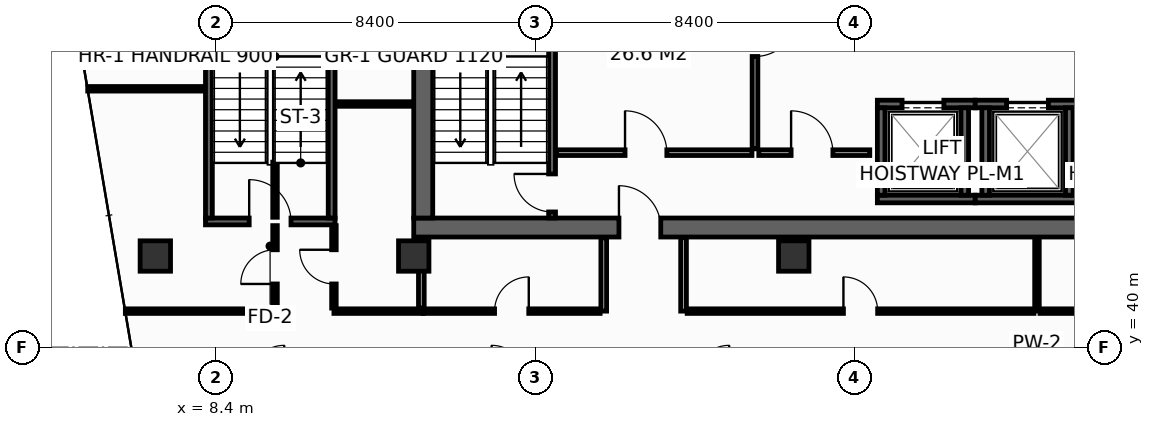
"""IFC4 building model, lengths in metres.
Left out: names, types, materials, properties, quantities, classifications, styles, units other than length and angle.
Written with IfcOpenShell. Run it as: python <this file> out.ifc"""

import sys

from ifc_helpers import new_model, si_unit, direction, frame, frame_2d, origin, origin_2d, place, context, subcontext, project, spatial, rectangle, hollow_rectangle, extrude, element, fill, save


model = new_model("IFC4")
c1 = context("Model", 3, precision=1e-05, world=origin(), true_north=direction((0.0, 1.0)))
c2 = subcontext(c1, "Body", "Model", "MODEL_VIEW")
j1 = project(units=[si_unit("LENGTHUNIT", "METRE"), si_unit("PLANEANGLEUNIT", "RADIAN")], contexts=[c1])
p1 = place(None, origin())
s1 = spatial("IfcSite", under=j1, at=p1, CompositionType="ELEMENT")
p2 = place(p1, origin())
s2 = spatial("IfcBuilding", under=s1, at=p2, CompositionType="ELEMENT")
p3 = place(p2, frame((0.0, 0.0, 182.8)))
s3 = spatial("IfcBuildingStorey", under=s2, at=p3, CompositionType="ELEMENT", Elevation=182.8)
p4 = place(p3, frame((13.6, 43.15, 0.0), z_axis=(0.0, 0.0, 1.0), x_axis=(1.0, 0.0, 0.0)))
e1 = element("IfcWall", 1, at=p4, inside=s3, PredefinedType="SHEAR", context=c2, shape_type="SweptSolid", body=[
    extrude(rectangle(XDim=32.7, YDim=0.5, at=frame_2d((16.35, 0.0))), origin(), (0.0, 0.0, 1.0), 3.55),
])
p5 = place(p4, frame((5.4, 0.0, 0.0)))
e2 = element("IfcOpeningElement", 2, at=p5, cuts=e1, PredefinedType="OPENING", context=c2, shape_type="SweptSolid", body=[
    extrude(rectangle(XDim=1.1, YDim=2.15, at=frame_2d((0.55, 1.075))), frame((0.0, 0.26, 0.0), z_axis=(0.0, -1.0, 0.0), x_axis=(1.0, 0.0, 0.0)), (0.0, 0.0, 1.0), 0.52),
])
p6 = place(p4, frame((25.6, 0.0, 0.0)))
e3 = element("IfcOpeningElement", 3, at=p6, cuts=e1, PredefinedType="OPENING", context=c2, shape_type="SweptSolid", body=[
    extrude(rectangle(XDim=1.1, YDim=2.15, at=frame_2d((0.55, 1.075))), frame((0.0, 0.26, 0.0), z_axis=(0.0, -1.0, 0.0), x_axis=(1.0, 0.0, 0.0)), (0.0, 0.0, 1.0), 0.52),
])
p7 = place(p3, frame((13.85, 43.4, 0.0), z_axis=(0.0, 0.0, 1.0), x_axis=(0.0, 1.0, 0.0)))
e4 = element("IfcWall", 4, at=p7, inside=s3, PredefinedType="SHEAR", context=c2, shape_type="SweptSolid", body=[
    extrude(rectangle(XDim=10.4, YDim=0.5, at=frame_2d((5.2, 0.0))), origin(), (0.0, 0.0, 1.0), 3.55),
])
for number, where, z_axis, x_axis in (
    (5, (6.8, 42.4, 0.0), (0.0, 0.0, 1.0), (1.0, 0.0, 0.0)),
    (6, (13.6, 42.4, 0.0), (0.0, 0.0, 1.0), (1.0, 0.0, 0.0)),
    (7, (23.6, 42.4, 0.0), (0.0, 0.0, 1.0), (1.0, 0.0, 0.0)),
):
    element("IfcColumn", number, at=place(p3, frame(where, z_axis=z_axis, x_axis=x_axis)), inside=s3, PredefinedType="COLUMN", context=c2, shape_type="SweptSolid", body=[
        extrude(hollow_rectangle(XDim=0.8, YDim=0.8, WallThickness=0.036, at=origin_2d()), origin(), (0.0, 0.0, 1.0), 3.8),
    ])
p8 = place(p3, frame((25.8, 43.9, 0.0), z_axis=(0.0, 0.0, 1.0), x_axis=(1.0, 0.0, 0.0)))
e8 = element("IfcWall", 8, at=p8, inside=s3, PredefinedType="SHEAR", context=c2, shape_type="SweptSolid", body=[
    extrude(rectangle(XDim=2.575, YDim=0.2, at=frame_2d((1.288, 0.0))), origin(), (0.0, 0.0, 1.0), 3.55),
])
p9 = place(p3, frame((25.8, 46.4, 0.0), z_axis=(0.0, 0.0, 1.0), x_axis=(1.0, 0.0, 0.0)))
e9 = element("IfcWall", 9, at=p9, inside=s3, PredefinedType="SHEAR", context=c2, shape_type="SweptSolid", body=[
    extrude(rectangle(XDim=2.575, YDim=0.2, at=frame_2d((1.288, 0.0))), origin(), (0.0, 0.0, 1.0), 3.55),
])
p10 = place(p9, frame((0.65, 0.0, 0.0)))
e10 = element("IfcOpeningElement", 10, at=p10, cuts=e9, PredefinedType="OPENING", context=c2, shape_type="SweptSolid", body=[
    extrude(rectangle(XDim=1.1, YDim=2.2, at=frame_2d((0.55, 1.1))), frame((0.0, 0.11, 0.0), z_axis=(0.0, -1.0, 0.0), x_axis=(1.0, 0.0, 0.0)), (0.0, 0.0, 1.0), 0.22),
])
for number, where, z_axis, x_axis in (
    (11, (25.9, 44.0, 0.0), (0.0, 0.0, 1.0), (0.0, 1.0, 0.0)),
    (12, (28.1, 44.0, 0.0), (0.0, 0.0, 1.0), (0.0, 1.0, 0.0)),
):
    element("IfcWall", number, at=place(p3, frame(where, z_axis=z_axis, x_axis=x_axis)), inside=s3, PredefinedType="SHEAR", context=c2, shape_type="SweptSolid", body=[
        extrude(rectangle(XDim=2.3, YDim=0.2, at=frame_2d((1.15, 0.0))), origin(), (0.0, 0.0, 1.0), 3.55),
    ])
p11 = place(p3, frame((28.375, 43.9, 0.0), z_axis=(0.0, 0.0, 1.0), x_axis=(1.0, 0.0, 0.0)))
e13 = element("IfcWall", 13, at=p11, inside=s3, PredefinedType="SHEAR", context=c2, shape_type="SweptSolid", body=[
    extrude(rectangle(XDim=2.75, YDim=0.2, at=frame_2d((1.375, 0.0))), origin(), (0.0, 0.0, 1.0), 3.55),
])
p12 = place(p3, frame((28.375, 46.4, 0.0), z_axis=(0.0, 0.0, 1.0), x_axis=(1.0, 0.0, 0.0)))
e14 = element("IfcWall", 14, at=p12, inside=s3, PredefinedType="SHEAR", context=c2, shape_type="SweptSolid", body=[
    extrude(rectangle(XDim=2.75, YDim=0.2, at=frame_2d((1.375, 0.0))), origin(), (0.0, 0.0, 1.0), 3.55),
])
p13 = place(p12, frame((0.825, 0.0, 0.0)))
e15 = element("IfcOpeningElement", 15, at=p13, cuts=e14, PredefinedType="OPENING", context=c2, shape_type="SweptSolid", body=[
    extrude(rectangle(XDim=1.1, YDim=2.2, at=frame_2d((0.55, 1.1))), frame((0.0, 0.11, 0.0), z_axis=(0.0, -1.0, 0.0), x_axis=(1.0, 0.0, 0.0)), (0.0, 0.0, 1.0), 0.22),
])
for number, where, z_axis, x_axis in (
    (16, (28.65, 44.0, 0.0), (0.0, 0.0, 1.0), (0.0, 1.0, 0.0)),
    (17, (30.85, 44.0, 0.0), (0.0, 0.0, 1.0), (0.0, 1.0, 0.0)),
):
    element("IfcWall", number, at=place(p3, frame(where, z_axis=z_axis, x_axis=x_axis)), inside=s3, PredefinedType="SHEAR", context=c2, shape_type="SweptSolid", body=[
        extrude(rectangle(XDim=2.3, YDim=0.2, at=frame_2d((1.15, 0.0))), origin(), (0.0, 0.0, 1.0), 3.55),
    ])
p14 = place(p3, frame((17.24, 43.4, 0.0), z_axis=(0.0, 0.0, 1.0), x_axis=(0.0, 1.0, 0.0)))
e18 = element("IfcWall", 18, at=p14, inside=s3, PredefinedType="SHEAR", context=c2, shape_type="SweptSolid", body=[
    extrude(rectangle(XDim=10.4, YDim=0.18, at=frame_2d((5.2, 0.0))), origin(), (0.0, 0.0, 1.0), 3.55),
])
p15 = place(p14, frame((0.16, 0.0, 0.0)))
e19 = element("IfcOpeningElement", 19, at=p15, cuts=e18, PredefinedType="OPENING", context=c2, shape_type="SweptSolid", body=[
    extrude(rectangle(XDim=1.0, YDim=2.15, at=frame_2d((0.5, 1.075))), frame((0.0, 0.1, 0.0), z_axis=(0.0, -1.0, 0.0), x_axis=(1.0, 0.0, 0.0)), (0.0, 0.0, 1.0), 0.2),
])
p16 = place(p3, frame((8.12, 43.31, 0.0), z_axis=(0.0, 0.0, 1.0), x_axis=(1.0, 0.0, 0.0)))
e20 = element("IfcWall", 20, at=p16, inside=s3, PredefinedType="SHEAR", context=c2, shape_type="SweptSolid", body=[
    extrude(rectangle(XDim=3.41, YDim=0.18, at=frame_2d((1.705, 0.0))), origin(), (0.0, 0.0, 1.0), 3.55),
])
p17 = place(p16, frame((1.15, 0.0, 0.0)))
e21 = element("IfcOpeningElement", 21, at=p17, cuts=e20, PredefinedType="OPENING", context=c2, shape_type="SweptSolid", body=[
    extrude(rectangle(XDim=1.1, YDim=2.15, at=frame_2d((0.55, 1.075))), frame((0.0, 0.1, 0.0), z_axis=(0.0, -1.0, 0.0), x_axis=(1.0, 0.0, 0.0)), (0.0, 0.0, 1.0), 0.2),
])
for number, where, z_axis, x_axis in (
    (22, (11.44, 43.4, 0.0), (0.0, 0.0, 1.0), (0.0, 1.0, 0.0)),
    (23, (8.21, 53.8, 0.0), (0.0, 0.0, 1.0), (0.0, -1.0, 0.0)),
):
    element("IfcWall", number, at=place(p3, frame(where, z_axis=z_axis, x_axis=x_axis)), inside=s3, PredefinedType="SHEAR", context=c2, shape_type="SweptSolid", body=[
        extrude(rectangle(XDim=10.4, YDim=0.18, at=frame_2d((5.2, 0.0))), origin(), (0.0, 0.0, 1.0), 3.55),
    ])
p18 = place(p3, frame((17.36, 45.12, 0.0), z_axis=(0.0, 0.0, 1.0), x_axis=(1.0, 0.0, 0.0)))
e24 = element("IfcWall", 24, at=p18, inside=s3, PredefinedType="PARTITIONING", context=c2, shape_type="SweptSolid", body=[
    extrude(rectangle(XDim=5.14, YDim=0.15, at=frame_2d((2.57, 0.0))), origin(), (0.0, 0.0, 1.0), 3.55),
])
p19 = place(p18, frame((1.8, 0.0, 0.0)))
e25 = element("IfcOpeningElement", 25, at=p19, cuts=e24, PredefinedType="OPENING", context=c2, shape_type="SweptSolid", body=[
    extrude(rectangle(XDim=1.1, YDim=2.15, at=frame_2d((0.55, 1.075))), frame((0.0, 0.085, 0.0), z_axis=(0.0, -1.0, 0.0), x_axis=(1.0, 0.0, 0.0)), (0.0, 0.0, 1.0), 0.17),
])
p20 = place(p3, frame((22.58, 50.55, 0.0), z_axis=(0.0, 0.0, 1.0), x_axis=(0.0, -1.0, 0.0)))
e26 = element("IfcWall", 26, at=p20, inside=s3, PredefinedType="PARTITIONING", context=c2, shape_type="SweptSolid", body=[
    extrude(rectangle(XDim=5.33, YDim=0.15, at=frame_2d((2.665, 0.0))), origin(), (0.0, 0.0, 1.0), 3.55),
])
p21 = place(p20, frame((1.8, 0.0, 0.0)))
e27 = element("IfcOpeningElement", 27, at=p21, cuts=e26, PredefinedType="OPENING", context=c2, shape_type="SweptSolid", body=[
    extrude(rectangle(XDim=1.1, YDim=2.15, at=frame_2d((0.55, 1.075))), frame((0.0, 0.085, 0.0), z_axis=(0.0, -1.0, 0.0), x_axis=(1.0, 0.0, 0.0)), (0.0, 0.0, 1.0), 0.17),
])
p22 = place(p3, frame((22.68, 45.12, 0.0), z_axis=(0.0, 0.0, 1.0), x_axis=(1.0, 0.0, 0.0)))
e28 = element("IfcWall", 28, at=p22, inside=s3, PredefinedType="PARTITIONING", context=c2, shape_type="SweptSolid", body=[
    extrude(rectangle(XDim=2.92, YDim=0.15, at=frame_2d((1.46, 0.0))), origin(), (0.0, 0.0, 1.0), 3.55),
])
p23 = place(p22, frame((0.85, 0.0, 0.0)))
e29 = element("IfcOpeningElement", 29, at=p23, cuts=e28, PredefinedType="OPENING", context=c2, shape_type="SweptSolid", body=[
    extrude(rectangle(XDim=1.1, YDim=2.15, at=frame_2d((0.55, 1.075))), frame((0.0, 0.085, 0.0), z_axis=(0.0, -1.0, 0.0), x_axis=(1.0, 0.0, 0.0)), (0.0, 0.0, 1.0), 0.17),
])
p24 = place(p3, frame((6.011, 40.95, 0.0), z_axis=(0.0, 0.0, 1.0), x_axis=(1.0, 0.0, 0.0)))
e30 = element("IfcWall", 30, at=p24, inside=s3, PredefinedType="PARTITIONING", context=c2, shape_type="SweptSolid", body=[
    extrude(rectangle(XDim=3.939, YDim=0.12, at=frame_2d((1.969, 0.0))), origin(), (0.0, 0.0, 1.0), 3.035),
])
p25 = place(p3, frame((11.5, 40.95, 0.0), z_axis=(0.0, 0.0, 1.0), x_axis=(1.0, 0.0, 0.0)))
e31 = element("IfcWall", 31, at=p25, inside=s3, PredefinedType="PARTITIONING", context=c2, shape_type="SweptSolid", body=[
    extrude(rectangle(XDim=2.35, YDim=0.12, at=frame_2d((1.175, 0.0))), origin(), (0.0, 0.0, 1.0), 3.55),
])
p26 = place(p3, frame((5.021, 46.8, 0.0), z_axis=(0.0, 0.0, 1.0), x_axis=(1.0, 0.0, 0.0)))
e32 = element("IfcWall", 32, at=p26, inside=s3, PredefinedType="PARTITIONING", context=c2, shape_type="SweptSolid", body=[
    extrude(rectangle(XDim=3.079, YDim=0.12, at=frame_2d((1.54, 0.0))), origin(), (0.0, 0.0, 1.0), 2.835),
])
p27 = place(p3, frame((9.95, 41.03, 0.0), z_axis=(0.0, 0.0, 1.0), x_axis=(0.0, 1.0, 0.0)))
e33 = element("IfcWall", 33, at=p27, inside=s3, PredefinedType="PARTITIONING", context=c2, shape_type="SweptSolid", body=[
    extrude(rectangle(XDim=2.17, YDim=0.12, at=frame_2d((1.085, 0.0))), origin(), (0.0, 0.0, 1.0), 2.835),
])
p28 = place(p27, frame((0.635, 0.0, 0.0)))
e34 = element("IfcOpeningElement", 34, at=p28, cuts=e33, PredefinedType="OPENING", context=c2, shape_type="SweptSolid", body=[
    extrude(rectangle(XDim=0.9, YDim=2.1, at=frame_2d((0.45, 1.05))), frame((0.0, 0.07, 0.0), z_axis=(0.0, -1.0, 0.0), x_axis=(1.0, 0.0, 0.0)), (0.0, 0.0, 1.0), 0.14),
])
p29 = place(p3, frame((9.95, 43.42, 0.0), z_axis=(0.0, 0.0, 1.0), x_axis=(0.0, 1.0, 0.0)))
e35 = element("IfcWall", 35, at=p29, inside=s3, PredefinedType="PARTITIONING", context=c2, shape_type="SweptSolid", body=[
    extrude(rectangle(XDim=1.45, YDim=0.12, at=frame_2d((0.725, 0.0))), origin(), (0.0, 0.0, 1.0), 3.55),
])
p30 = place(p3, frame((11.55, 46.4, 0.0), z_axis=(0.0, 0.0, 1.0), x_axis=(1.0, 0.0, 0.0)))
e36 = element("IfcWall", 36, at=p30, inside=s3, PredefinedType="PARTITIONING", context=c2, shape_type="SweptSolid", body=[
    extrude(rectangle(XDim=2.03, YDim=0.12, at=frame_2d((1.015, 0.0))), origin(), (0.0, 0.0, 1.0), 3.55),
])
p31 = place(p3, frame((11.5, 41.03, 0.0), z_axis=(0.0, 0.0, 1.0), x_axis=(0.0, 1.0, 0.0)))
e37 = element("IfcWall", 37, at=p31, inside=s3, PredefinedType="PARTITIONING", context=c2, shape_type="SweptSolid", body=[
    extrude(rectangle(XDim=2.17, YDim=0.12, at=frame_2d((1.085, 0.0))), origin(), (0.0, 0.0, 1.0), 2.835),
])
p32 = place(p31, frame((0.635, 0.0, 0.0)))
e38 = element("IfcOpeningElement", 38, at=p32, cuts=e37, PredefinedType="OPENING", context=c2, shape_type="SweptSolid", body=[
    extrude(rectangle(XDim=0.9, YDim=2.1, at=frame_2d((0.45, 1.05))), frame((0.0, 0.07, 0.0), z_axis=(0.0, -1.0, 0.0), x_axis=(1.0, 0.0, 0.0)), (0.0, 0.0, 1.0), 0.14),
])
p33 = place(p3, frame((13.8, 41.03, 0.0), z_axis=(0.0, 0.0, 1.0), x_axis=(0.0, 1.0, 0.0)))
e39 = element("IfcWall", 39, at=p33, inside=s3, PredefinedType="PARTITIONING", context=c2, shape_type="SweptSolid", body=[
    extrude(rectangle(XDim=1.85, YDim=0.15, at=frame_2d((0.925, 0.0))), origin(), (0.0, 0.0, 1.0), 3.55),
])
for number, where, z_axis, x_axis in (
    (40, (18.6, 40.95, 0.0), (0.0, 0.0, 1.0), (0.0, 1.0, 0.0)),
    (41, (20.7, 40.95, 0.0), (0.0, 0.0, 1.0), (0.0, 1.0, 0.0)),
):
    element("IfcWall", number, at=place(p3, frame(where, z_axis=z_axis, x_axis=x_axis)), inside=s3, PredefinedType="PARTITIONING", context=c2, shape_type="SweptSolid", body=[
        extrude(rectangle(XDim=1.93, YDim=0.15, at=frame_2d((0.965, 0.0))), origin(), (0.0, 0.0, 1.0), 3.55),
    ])
p34 = place(p3, frame((13.85, 40.95, 0.0), z_axis=(0.0, 0.0, 1.0), x_axis=(1.0, 0.0, 0.0)))
e42 = element("IfcWall", 42, at=p34, inside=s3, PredefinedType="PARTITIONING", context=c2, shape_type="SweptSolid", body=[
    extrude(rectangle(XDim=4.655, YDim=0.12, at=frame_2d((2.327, 0.0))), origin(), (0.0, 0.0, 1.0), 3.55),
])
p35 = place(p34, frame((1.877, 0.0, 0.0)))
e43 = element("IfcOpeningElement", 43, at=p35, cuts=e42, PredefinedType="OPENING", context=c2, shape_type="SweptSolid", body=[
    extrude(rectangle(XDim=0.9, YDim=2.1, at=frame_2d((0.45, 1.05))), frame((0.0, 0.07, 0.0), z_axis=(0.0, -1.0, 0.0), x_axis=(1.0, 0.0, 0.0)), (0.0, 0.0, 1.0), 0.14),
])
p36 = place(p3, frame((30.0, 40.95, 0.0), z_axis=(0.0, 0.0, 1.0), x_axis=(0.0, 1.0, 0.0)))
e44 = element("IfcWall", 44, at=p36, inside=s3, PredefinedType="PARTITIONING", context=c2, shape_type="SweptSolid", body=[
    extrude(rectangle(XDim=1.93, YDim=0.12, at=frame_2d((0.965, 0.0))), origin(), (0.0, 0.0, 1.0), 2.835),
])
p37 = place(p3, frame((20.795, 40.95, 0.0), z_axis=(0.0, 0.0, 1.0), x_axis=(1.0, 0.0, 0.0)))
e45 = element("IfcWall", 45, at=p37, inside=s3, PredefinedType="PARTITIONING", context=c2, shape_type="SweptSolid", body=[
    extrude(rectangle(XDim=9.125, YDim=0.12, at=frame_2d((4.562, 0.0))), origin(), (0.0, 0.0, 1.0), 2.835),
])
p38 = place(p37, frame((4.112, 0.0, 0.0)))
e46 = element("IfcOpeningElement", 46, at=p38, cuts=e45, PredefinedType="OPENING", context=c2, shape_type="SweptSolid", body=[
    extrude(rectangle(XDim=0.9, YDim=2.1, at=frame_2d((0.45, 1.05))), frame((0.0, 0.07, 0.0), z_axis=(0.0, -1.0, 0.0), x_axis=(1.0, 0.0, 0.0)), (0.0, 0.0, 1.0), 0.14),
])
p39 = place(p3, frame((30.08, 40.95, 0.0), z_axis=(0.0, 0.0, 1.0), x_axis=(1.0, 0.0, 0.0)))
e47 = element("IfcWall", 47, at=p39, inside=s3, PredefinedType="PARTITIONING", context=c2, shape_type="SweptSolid", body=[
    extrude(rectangle(XDim=8.625, YDim=0.12, at=frame_2d((4.312, 0.0))), origin(), (0.0, 0.0, 1.0), 2.835),
])
p40 = place(p39, frame((3.862, 0.0, 0.0)))
e48 = element("IfcOpeningElement", 48, at=p40, cuts=e47, PredefinedType="OPENING", context=c2, shape_type="SweptSolid", body=[
    extrude(rectangle(XDim=0.9, YDim=2.1, at=frame_2d((0.45, 1.05))), frame((0.0, 0.07, 0.0), z_axis=(0.0, -1.0, 0.0), x_axis=(1.0, 0.0, 0.0)), (0.0, 0.0, 1.0), 0.14),
])
p41 = place(p10, origin())
e49 = element("IfcDoor", 49, at=p41, inside=s3, OperationType="SLIDING_TO_LEFT", PredefinedType="DOOR", context=c2, shape_type="SweptSolid", body=[
    extrude(rectangle(XDim=1.1, YDim=2.2, at=frame_2d((0.55, 1.1))), frame((0.0, 0.025, 0.0), z_axis=(0.0, -1.0, 0.0), x_axis=(1.0, 0.0, 0.0)), (0.0, 0.0, 1.0), 0.05),
])
fill(e10, e49)
p42 = place(p13, origin())
e50 = element("IfcDoor", 50, at=p42, inside=s3, OperationType="SLIDING_TO_LEFT", PredefinedType="DOOR", context=c2, shape_type="SweptSolid", body=[
    extrude(rectangle(XDim=1.1, YDim=2.2, at=frame_2d((0.55, 1.1))), frame((0.0, 0.025, 0.0), z_axis=(0.0, -1.0, 0.0), x_axis=(1.0, 0.0, 0.0)), (0.0, 0.0, 1.0), 0.05),
])
fill(e15, e50)
p43 = place(p15, origin())
e51 = element("IfcDoor", 51, at=p43, inside=s3, OperationType="SINGLE_SWING_RIGHT", PredefinedType="DOOR", context=c2, shape_type="SweptSolid", body=[
    extrude(rectangle(XDim=1.0, YDim=2.15, at=frame_2d((0.5, 1.075))), frame((0.0, 0.025, 0.0), z_axis=(0.0, -1.0, 0.0), x_axis=(1.0, 0.0, 0.0)), (0.0, 0.0, 1.0), 0.05),
])
fill(e19, e51)
p44 = place(p17, origin())
e52 = element("IfcDoor", 52, at=p44, inside=s3, OperationType="SINGLE_SWING_LEFT", PredefinedType="DOOR", context=c2, shape_type="SweptSolid", body=[
    extrude(rectangle(XDim=1.1, YDim=2.15, at=frame_2d((0.55, 1.075))), frame((0.0, 0.025, 0.0), z_axis=(0.0, -1.0, 0.0), x_axis=(1.0, 0.0, 0.0)), (0.0, 0.0, 1.0), 0.05),
])
fill(e21, e52)
p45 = place(p19, origin())
e53 = element("IfcDoor", 53, at=p45, inside=s3, OperationType="SINGLE_SWING_LEFT", PredefinedType="DOOR", context=c2, shape_type="SweptSolid", body=[
    extrude(rectangle(XDim=1.1, YDim=2.15, at=frame_2d((0.55, 1.075))), frame((0.0, 0.025, 0.0), z_axis=(0.0, -1.0, 0.0), x_axis=(1.0, 0.0, 0.0)), (0.0, 0.0, 1.0), 0.05),
])
fill(e25, e53)
p46 = place(p21, origin())
e54 = element("IfcDoor", 54, at=p46, inside=s3, OperationType="SINGLE_SWING_LEFT", PredefinedType="DOOR", context=c2, shape_type="SweptSolid", body=[
    extrude(rectangle(XDim=1.1, YDim=2.15, at=frame_2d((0.55, 1.075))), frame((0.0, 0.025, 0.0), z_axis=(0.0, -1.0, 0.0), x_axis=(1.0, 0.0, 0.0)), (0.0, 0.0, 1.0), 0.05),
])
fill(e27, e54)
p47 = place(p23, origin())
e55 = element("IfcDoor", 55, at=p47, inside=s3, OperationType="SINGLE_SWING_LEFT", PredefinedType="DOOR", context=c2, shape_type="SweptSolid", body=[
    extrude(rectangle(XDim=1.1, YDim=2.15, at=frame_2d((0.55, 1.075))), frame((0.0, 0.025, 0.0), z_axis=(0.0, -1.0, 0.0), x_axis=(1.0, 0.0, 0.0)), (0.0, 0.0, 1.0), 0.05),
])
fill(e29, e55)
p48 = place(p5, origin())
e56 = element("IfcDoor", 56, at=p48, inside=s3, OperationType="SINGLE_SWING_LEFT", PredefinedType="DOOR", context=c2, shape_type="SweptSolid", body=[
    extrude(rectangle(XDim=1.1, YDim=2.15, at=frame_2d((0.55, 1.075))), frame((0.0, 0.025, 0.0), z_axis=(0.0, -1.0, 0.0), x_axis=(1.0, 0.0, 0.0)), (0.0, 0.0, 1.0), 0.05),
])
fill(e2, e56)
p49 = place(p28, origin())
e57 = element("IfcDoor", 57, at=p49, inside=s3, OperationType="SINGLE_SWING_LEFT", PredefinedType="DOOR", context=c2, shape_type="SweptSolid", body=[
    extrude(rectangle(XDim=0.9, YDim=2.1, at=frame_2d((0.45, 1.05))), frame((0.0, 0.025, 0.0), z_axis=(0.0, -1.0, 0.0), x_axis=(1.0, 0.0, 0.0)), (0.0, 0.0, 1.0), 0.05),
])
fill(e34, e57)
p50 = place(p32, origin())
e58 = element("IfcDoor", 58, at=p50, inside=s3, OperationType="SINGLE_SWING_RIGHT", PredefinedType="DOOR", context=c2, shape_type="SweptSolid", body=[
    extrude(rectangle(XDim=0.9, YDim=2.1, at=frame_2d((0.45, 1.05))), frame((0.0, 0.025, 0.0), z_axis=(0.0, -1.0, 0.0), x_axis=(1.0, 0.0, 0.0)), (0.0, 0.0, 1.0), 0.05),
])
fill(e38, e58)
p51 = place(p35, origin())
e59 = element("IfcDoor", 59, at=p51, inside=s3, OperationType="SINGLE_SWING_RIGHT", PredefinedType="DOOR", context=c2, shape_type="SweptSolid", body=[
    extrude(rectangle(XDim=0.9, YDim=2.1, at=frame_2d((0.45, 1.05))), frame((0.0, 0.025, 0.0), z_axis=(0.0, -1.0, 0.0), x_axis=(1.0, 0.0, 0.0)), (0.0, 0.0, 1.0), 0.05),
])
fill(e43, e59)
p52 = place(p38, origin())
e60 = element("IfcDoor", 60, at=p52, inside=s3, OperationType="SINGLE_SWING_LEFT", PredefinedType="DOOR", context=c2, shape_type="SweptSolid", body=[
    extrude(rectangle(XDim=0.9, YDim=2.1, at=frame_2d((0.45, 1.05))), frame((0.0, 0.025, 0.0), z_axis=(0.0, -1.0, 0.0), x_axis=(1.0, 0.0, 0.0)), (0.0, 0.0, 1.0), 0.05),
])
fill(e46, e60)
save(model, sys.argv[1])
